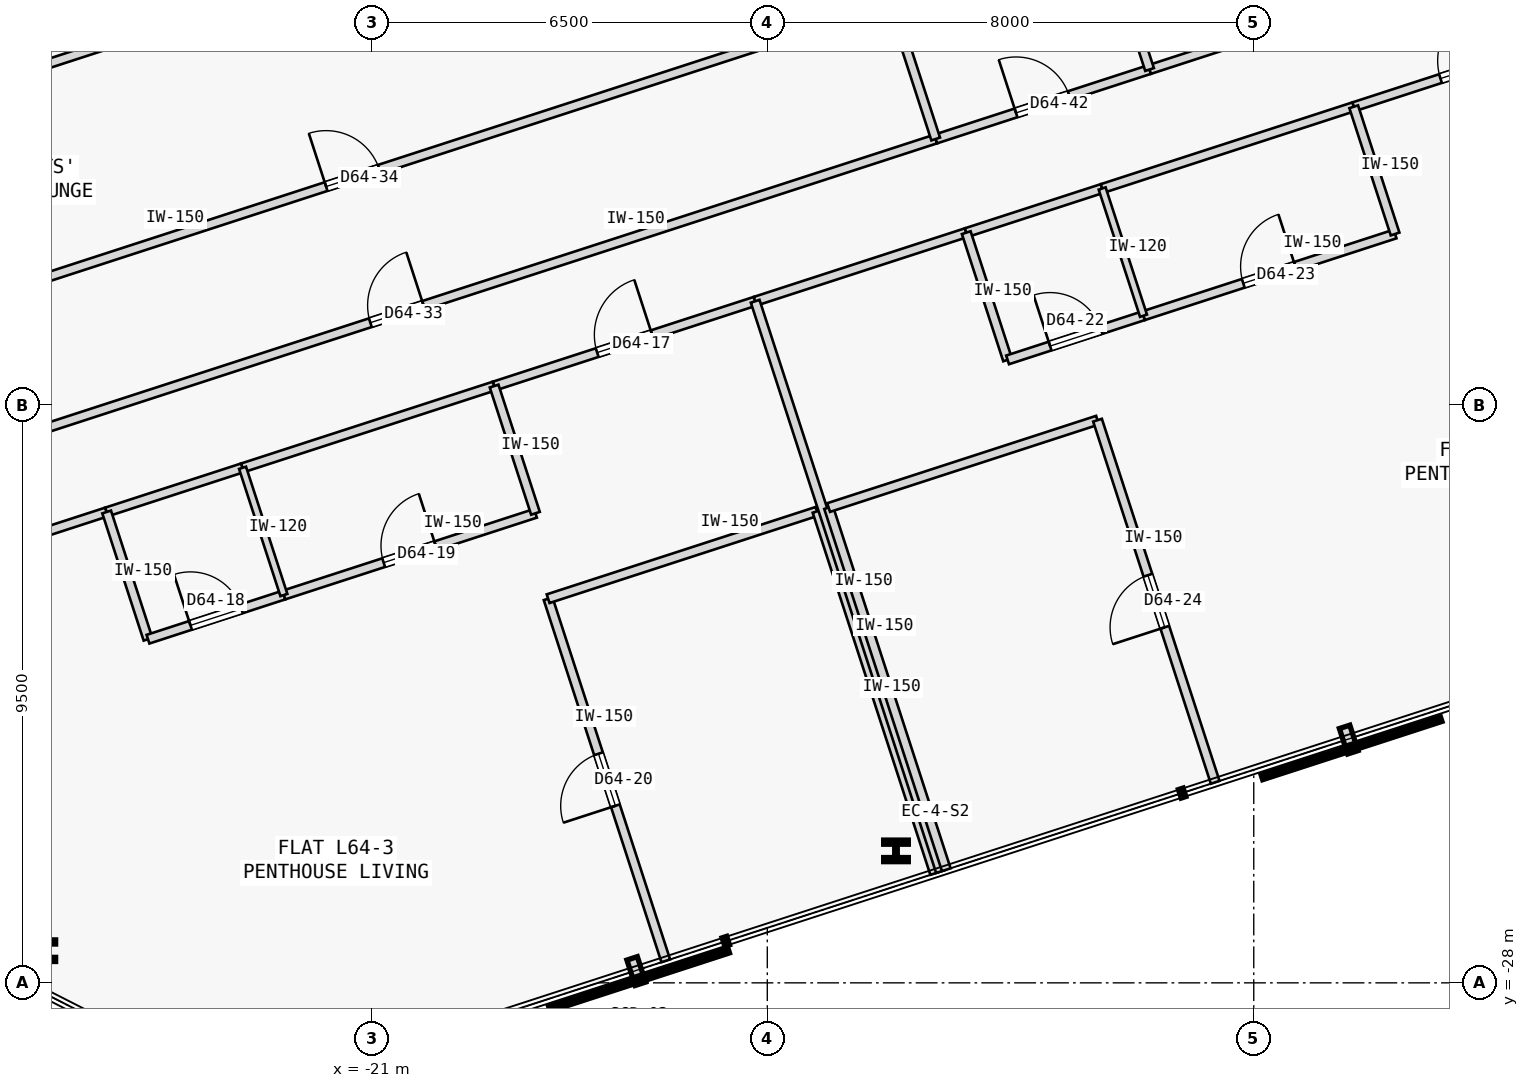
"""IFC4 building model, lengths in metres.
Left out: names, types, materials, properties, quantities, classifications, styles, units other than length and angle.
Written with IfcOpenShell. Run it as: python <this file> out.ifc"""

import sys

from ifc_helpers import new_model, si_unit, direction, frame, frame_2d, origin, origin_2d, place, context, subcontext, project, spatial, rectangle, i_section, extrude, element, fill, save


model = new_model("IFC4")
c1 = context("Model", 3, precision=1e-05, world=origin(), true_north=direction((0.0, 1.0)))
c2 = subcontext(c1, "Body", "Model", "MODEL_VIEW")
j1 = project(units=[si_unit("LENGTHUNIT", "METRE"), si_unit("PLANEANGLEUNIT", "RADIAN")], contexts=[c1])
p1 = place(None, origin())
s1 = spatial("IfcSite", under=j1, at=p1, CompositionType="ELEMENT")
p2 = place(p1, origin())
s2 = spatial("IfcBuilding", under=s1, at=p2, CompositionType="ELEMENT")
p3 = place(p2, frame((0.0, 0.0, 241.05)))
s3 = spatial("IfcBuildingStorey", under=s2, at=p3, CompositionType="ELEMENT", Elevation=241.05)
for number, where, z_axis, x_axis in (
    (1, (-12.384, -25.83, 0.0), (0.0, 0.0, 1.0), (1.0, 0.0, 0.0)),
    (2, (-26.406, -27.471, 0.0), (0.0, 0.0, 1.0), (1.0, 0.0, 0.0)),
):
    element("IfcColumn", number, at=place(p3, frame(where, z_axis=z_axis, x_axis=x_axis)), inside=s3, PredefinedType="COLUMN", context=c2, shape_type="SweptSolid", body=[
        extrude(i_section(OverallWidth=0.405, OverallDepth=0.355, WebThickness=0.042, FlangeThickness=0.068, FilletRadius=0.015, at=origin_2d()), origin(), (0.0, 0.0, 1.0), 3.35),
    ])
p4 = place(p3, frame((-28.95, -21.421, 0.0), z_axis=(0.0, 0.0, 1.0), x_axis=(0.951052151329, 0.309030428036, 0.0)))
e3 = element("IfcWall", 3, at=p4, inside=s3, PredefinedType="PARTITIONING", context=c2, shape_type="SweptSolid", body=[
    extrude(rectangle(XDim=3.77, YDim=0.15, at=frame_2d((1.885, 0.0))), origin(), (0.0, 0.0, 1.0), 3.125),
])
p5 = place(p3, frame((-18.992, -18.186, 0.0), z_axis=(0.0, 0.0, 1.0), x_axis=(0.951067846467, 0.308982121516, 0.0)))
e4 = element("IfcWall", 4, at=p5, inside=s3, PredefinedType="PARTITIONING", context=c2, shape_type="SweptSolid", body=[
    extrude(rectangle(XDim=4.514, YDim=0.15, at=frame_2d((2.257, 0.0))), origin(), (0.0, 0.0, 1.0), 3.125),
])
p6 = place(p5, frame((1.782, 0.0, 0.0)))
e5 = element("IfcOpeningElement", 5, at=p6, cuts=e4, PredefinedType="OPENING", context=c2, shape_type="SweptSolid", body=[
    extrude(rectangle(XDim=0.95, YDim=2.15, at=frame_2d((0.475, 1.075))), frame((0.0, 0.085, 0.0), z_axis=(0.0, -1.0, 0.0), x_axis=(1.0, 0.0, 0.0)), (0.0, 0.0, 1.0), 0.17),
])
p7 = place(p3, frame((-25.365, -20.256, 0.0), z_axis=(0.0, 0.0, 1.0), x_axis=(0.951076048914, 0.308956872689, 0.0)))
e6 = element("IfcWall", 6, at=p7, inside=s3, PredefinedType="PARTITIONING", context=c2, shape_type="SweptSolid", body=[
    extrude(rectangle(XDim=2.35, YDim=0.15, at=frame_2d((1.175, 0.0))), origin(), (0.0, 0.0, 1.0), 3.125),
])
p8 = place(p3, frame((-23.129, -19.53, 0.0), z_axis=(0.0, 0.0, 1.0), x_axis=(0.951036130958, 0.309079726951, 0.0)))
e7 = element("IfcWall", 7, at=p8, inside=s3, PredefinedType="PARTITIONING", context=c2, shape_type="SweptSolid", body=[
    extrude(rectangle(XDim=4.35, YDim=0.15, at=frame_2d((2.175, 0.0))), origin(), (0.0, 0.0, 1.0), 3.125),
])
p9 = place(p3, frame((-14.699, -16.791, 0.0), z_axis=(0.0, 0.0, 1.0), x_axis=(0.951050780541, 0.309034646652, 0.0)))
e8 = element("IfcWall", 8, at=p9, inside=s3, PredefinedType="PARTITIONING", context=c2, shape_type="SweptSolid", body=[
    extrude(rectangle(XDim=3.65, YDim=0.15, at=frame_2d((1.825, 0.0))), origin(), (0.0, 0.0, 1.0), 3.125),
])
p10 = place(p3, frame((-4.856, -13.593, 0.0), z_axis=(0.0, 0.0, 1.0), x_axis=(0.951054051148, 0.309024581215, 0.0)))
e9 = element("IfcWall", 9, at=p10, inside=s3, PredefinedType="PARTITIONING", context=c2, shape_type="SweptSolid", body=[
    extrude(rectangle(XDim=3.95, YDim=0.15, at=frame_2d((1.975, 0.0))), origin(), (0.0, 0.0, 1.0), 3.125),
])
p11 = place(p10, frame((1.5, 0.0, 0.0)))
e10 = element("IfcOpeningElement", 10, at=p11, cuts=e9, PredefinedType="OPENING", context=c2, shape_type="SweptSolid", body=[
    extrude(rectangle(XDim=0.95, YDim=2.15, at=frame_2d((0.475, 1.075))), frame((0.0, 0.085, 0.0), z_axis=(0.0, -1.0, 0.0), x_axis=(1.0, 0.0, 0.0)), (0.0, 0.0, 1.0), 0.17),
])
p12 = place(p3, frame((-11.228, -15.663, 0.0), z_axis=(0.0, 0.0, 1.0), x_axis=(0.951076048914, 0.308956872689, 0.0)))
e11 = element("IfcWall", 11, at=p12, inside=s3, PredefinedType="PARTITIONING", context=c2, shape_type="SweptSolid", body=[
    extrude(rectangle(XDim=2.35, YDim=0.15, at=frame_2d((1.175, 0.0))), origin(), (0.0, 0.0, 1.0), 3.125),
])
p13 = place(p3, frame((-8.993, -14.937, 0.0), z_axis=(0.0, 0.0, 1.0), x_axis=(0.951052627573, 0.309028962374, 0.0)))
e12 = element("IfcWall", 12, at=p13, inside=s3, PredefinedType="PARTITIONING", context=c2, shape_type="SweptSolid", body=[
    extrude(rectangle(XDim=4.35, YDim=0.15, at=frame_2d((2.175, 0.0))), origin(), (0.0, 0.0, 1.0), 3.125),
])
p14 = place(p3, frame((-29.45, -19.881, 0.0), z_axis=(0.0, 0.0, 1.0), x_axis=(0.95105650271, 0.309017036186, 0.0)))
e13 = element("IfcWall", 13, at=p14, inside=s3, PredefinedType="PARTITIONING", context=c2, shape_type="SweptSolid", body=[
    extrude(rectangle(XDim=18.632, YDim=0.15, at=frame_2d((9.316, 0.0))), origin(), (0.0, 0.0, 1.0), 3.125),
])
p15 = place(p14, frame((8.856, 0.0, 0.0)))
e14 = element("IfcOpeningElement", 14, at=p15, cuts=e13, PredefinedType="OPENING", context=c2, shape_type="SweptSolid", body=[
    extrude(rectangle(XDim=0.92, YDim=2.15, at=frame_2d((0.46, 1.075))), frame((0.0, 0.085, 0.0), z_axis=(0.0, -1.0, 0.0), x_axis=(1.0, 0.0, 0.0)), (0.0, 0.0, 1.0), 0.17),
])
p16 = place(p3, frame((-11.73, -14.123, 0.0), z_axis=(0.0, 0.0, 1.0), x_axis=(0.951052502763, 0.309029346483, 0.0)))
e15 = element("IfcWall", 15, at=p16, inside=s3, PredefinedType="PARTITIONING", context=c2, shape_type="SweptSolid", body=[
    extrude(rectangle(XDim=3.698, YDim=0.15, at=frame_2d((1.849, 0.0))), origin(), (0.0, 0.0, 1.0), 3.125),
])
p17 = place(p16, frame((1.389, 0.0, 0.0)))
e16 = element("IfcOpeningElement", 16, at=p17, cuts=e15, PredefinedType="OPENING", context=c2, shape_type="SweptSolid", body=[
    extrude(rectangle(XDim=0.92, YDim=2.15, at=frame_2d((0.46, 1.075))), frame((0.0, 0.085, 0.0), z_axis=(0.0, -1.0, 0.0), x_axis=(1.0, 0.0, 0.0)), (0.0, 0.0, 1.0), 0.17),
])
p18 = place(p3, frame((-8.213, -12.98, 0.0), z_axis=(0.0, 0.0, 1.0), x_axis=(0.951058260096, 0.309011627456, 0.0)))
e17 = element("IfcWall", 17, at=p18, inside=s3, PredefinedType="PARTITIONING", context=c2, shape_type="SweptSolid", body=[
    extrude(rectangle(XDim=4.746, YDim=0.15, at=frame_2d((2.373, 0.0))), origin(), (0.0, 0.0, 1.0), 3.125),
])
p19 = place(p3, frame((-24.685, -22.349, 0.0), z_axis=(0.0, 0.0, 1.0), x_axis=(-0.309060979314, 0.951042223598, 0.0)))
e18 = element("IfcWall", 18, at=p19, inside=s3, PredefinedType="PARTITIONING", context=c2, shape_type="SweptSolid", body=[
    extrude(rectangle(XDim=2.2, YDim=0.15, at=frame_2d((1.1, 0.0))), origin(), (0.0, 0.0, 1.0), 3.125),
])
p20 = place(p3, frame((-24.685, -22.349, 0.0), z_axis=(0.0, 0.0, 1.0), x_axis=(0.951066131077, 0.308987401554, 0.0)))
e19 = element("IfcWall", 19, at=p20, inside=s3, PredefinedType="PARTITIONING", context=c2, shape_type="SweptSolid", body=[
    extrude(rectangle(XDim=2.35, YDim=0.15, at=frame_2d((1.175, 0.0))), origin(), (0.0, 0.0, 1.0), 3.125),
])
p21 = place(p20, frame((0.735, 0.0, 0.0)))
e20 = element("IfcOpeningElement", 20, at=p21, cuts=e19, PredefinedType="OPENING", context=c2, shape_type="SweptSolid", body=[
    extrude(rectangle(XDim=0.88, YDim=2.15, at=frame_2d((0.44, 1.075))), frame((0.0, 0.085, 0.0), z_axis=(0.0, -1.0, 0.0), x_axis=(1.0, 0.0, 0.0)), (0.0, 0.0, 1.0), 0.17),
])
p22 = place(p3, frame((-22.45, -21.623, 0.0), z_axis=(0.0, 0.0, 1.0), x_axis=(0.951057987102, 0.309012467661, 0.0)))
e21 = element("IfcWall", 21, at=p22, inside=s3, PredefinedType="PARTITIONING", context=c2, shape_type="SweptSolid", body=[
    extrude(rectangle(XDim=4.35, YDim=0.15, at=frame_2d((2.175, 0.0))), origin(), (0.0, 0.0, 1.0), 3.125),
])
p23 = place(p22, frame((1.725, 0.0, 0.0)))
e22 = element("IfcOpeningElement", 22, at=p23, cuts=e21, PredefinedType="OPENING", context=c2, shape_type="SweptSolid", body=[
    extrude(rectangle(XDim=0.9, YDim=2.15, at=frame_2d((0.45, 1.075))), frame((0.0, 0.085, 0.0), z_axis=(0.0, -1.0, 0.0), x_axis=(1.0, 0.0, 0.0)), (0.0, 0.0, 1.0), 0.17),
])
p24 = place(p3, frame((-18.312, -20.278, 0.0), z_axis=(0.0, 0.0, 1.0), x_axis=(-0.309028364152, 0.951052821956, 0.0)))
e23 = element("IfcWall", 23, at=p24, inside=s3, PredefinedType="PARTITIONING", context=c2, shape_type="SweptSolid", body=[
    extrude(rectangle(XDim=2.2, YDim=0.15, at=frame_2d((1.1, 0.0))), origin(), (0.0, 0.0, 1.0), 3.125),
])
p25 = place(p3, frame((-16.169, -27.638, 0.0), z_axis=(0.0, 0.0, 1.0), x_axis=(-0.309049046683, 0.951046101272, 0.0)))
e24 = element("IfcWall", 24, at=p25, inside=s3, PredefinedType="PARTITIONING", context=c2, shape_type="SweptSolid", body=[
    extrude(rectangle(XDim=6.262, YDim=0.15, at=frame_2d((3.131, 0.0))), origin(), (0.0, 0.0, 1.0), 3.125),
])
p26 = place(p25, frame((2.681, 0.0, 0.0)))
e25 = element("IfcOpeningElement", 25, at=p26, cuts=e24, PredefinedType="OPENING", context=c2, shape_type="SweptSolid", body=[
    extrude(rectangle(XDim=0.9, YDim=2.15, at=frame_2d((0.45, 1.075))), frame((0.0, 0.085, 0.0), z_axis=(0.0, -1.0, 0.0), x_axis=(1.0, 0.0, 0.0)), (0.0, 0.0, 1.0), 0.17),
])
p27 = place(p3, frame((-18.104, -21.683, 0.0), z_axis=(0.0, 0.0, 1.0), x_axis=(0.951055286502, 0.309020779263, 0.0)))
e26 = element("IfcWall", 26, at=p27, inside=s3, PredefinedType="PARTITIONING", context=c2, shape_type="SweptSolid", body=[
    extrude(rectangle(XDim=4.65, YDim=0.15, at=frame_2d((2.325, 0.0))), origin(), (0.0, 0.0, 1.0), 3.125),
])
p28 = place(p3, frame((-11.747, -26.201, 0.0), z_axis=(0.0, 0.0, 1.0), x_axis=(-0.309013782848, 0.951057559777, 0.0)))
e27 = element("IfcWall", 27, at=p28, inside=s3, PredefinedType="PARTITIONING", context=c2, shape_type="SweptSolid", body=[
    extrude(rectangle(XDim=6.262, YDim=0.15, at=frame_2d((3.131, 0.0))), origin(), (0.0, 0.0, 1.0), 3.125),
])
p29 = place(p3, frame((-11.652, -26.17, 0.0), z_axis=(0.0, 0.0, 1.0), x_axis=(-0.308999867152, 0.951062081097, 0.0)))
e28 = element("IfcWall", 28, at=p29, inside=s3, PredefinedType="PARTITIONING", context=c2, shape_type="SweptSolid", body=[
    extrude(rectangle(XDim=9.862, YDim=0.15, at=frame_2d((4.931, 0.0))), origin(), (0.0, 0.0, 1.0), 3.125),
])
p30 = place(p3, frame((-22.45, -21.623, 0.0), z_axis=(0.0, 0.0, 1.0), x_axis=(-0.308960600764, 0.951074837842, 0.0)))
e29 = element("IfcWall", 29, at=p30, inside=s3, PredefinedType="PARTITIONING", context=c2, shape_type="SweptSolid", body=[
    extrude(rectangle(XDim=2.2, YDim=0.12, at=frame_2d((1.1, 0.0))), origin(), (0.0, 0.0, 1.0), 3.125),
])
p31 = place(p3, frame((-10.548, -17.755, 0.0), z_axis=(0.0, 0.0, 1.0), x_axis=(-0.309060979314, 0.951042223598, 0.0)))
e30 = element("IfcWall", 30, at=p31, inside=s3, PredefinedType="PARTITIONING", context=c2, shape_type="SweptSolid", body=[
    extrude(rectangle(XDim=2.2, YDim=0.15, at=frame_2d((1.1, 0.0))), origin(), (0.0, 0.0, 1.0), 3.125),
])
p32 = place(p3, frame((-10.548, -17.755, 0.0), z_axis=(0.0, 0.0, 1.0), x_axis=(0.951076048914, 0.308956872689, 0.0)))
e31 = element("IfcWall", 31, at=p32, inside=s3, PredefinedType="PARTITIONING", context=c2, shape_type="SweptSolid", body=[
    extrude(rectangle(XDim=2.35, YDim=0.15, at=frame_2d((1.175, 0.0))), origin(), (0.0, 0.0, 1.0), 3.125),
])
p33 = place(p32, frame((0.735, 0.0, 0.0)))
e32 = element("IfcOpeningElement", 32, at=p33, cuts=e31, PredefinedType="OPENING", context=c2, shape_type="SweptSolid", body=[
    extrude(rectangle(XDim=0.88, YDim=2.15, at=frame_2d((0.44, 1.075))), frame((0.0, 0.085, 0.0), z_axis=(0.0, -1.0, 0.0), x_axis=(1.0, 0.0, 0.0)), (0.0, 0.0, 1.0), 0.17),
])
p34 = place(p3, frame((-8.313, -17.029, 0.0), z_axis=(0.0, 0.0, 1.0), x_axis=(0.951052627573, 0.309028962374, 0.0)))
e33 = element("IfcWall", 33, at=p34, inside=s3, PredefinedType="PARTITIONING", context=c2, shape_type="SweptSolid", body=[
    extrude(rectangle(XDim=4.35, YDim=0.15, at=frame_2d((2.175, 0.0))), origin(), (0.0, 0.0, 1.0), 3.125),
])
p35 = place(p34, frame((1.725, 0.0, 0.0)))
e34 = element("IfcOpeningElement", 34, at=p35, cuts=e33, PredefinedType="OPENING", context=c2, shape_type="SweptSolid", body=[
    extrude(rectangle(XDim=0.9, YDim=2.15, at=frame_2d((0.45, 1.075))), frame((0.0, 0.085, 0.0), z_axis=(0.0, -1.0, 0.0), x_axis=(1.0, 0.0, 0.0)), (0.0, 0.0, 1.0), 0.17),
])
p36 = place(p3, frame((-4.176, -15.685, 0.0), z_axis=(0.0, 0.0, 1.0), x_axis=(-0.309060979314, 0.951042223598, 0.0)))
e35 = element("IfcWall", 35, at=p36, inside=s3, PredefinedType="PARTITIONING", context=c2, shape_type="SweptSolid", body=[
    extrude(rectangle(XDim=2.2, YDim=0.15, at=frame_2d((1.1, 0.0))), origin(), (0.0, 0.0, 1.0), 3.125),
])
p37 = place(p3, frame((-11.557, -26.139, 0.0), z_axis=(0.0, 0.0, 1.0), x_axis=(-0.309013782848, 0.951057559777, 0.0)))
e36 = element("IfcWall", 36, at=p37, inside=s3, PredefinedType="PARTITIONING", context=c2, shape_type="SweptSolid", body=[
    extrude(rectangle(XDim=6.262, YDim=0.15, at=frame_2d((3.131, 0.0))), origin(), (0.0, 0.0, 1.0), 3.125),
])
p38 = place(p3, frame((-13.492, -20.184, 0.0), z_axis=(0.0, 0.0, 1.0), x_axis=(0.951065702951, 0.308988719326, 0.0)))
e37 = element("IfcWall", 37, at=p38, inside=s3, PredefinedType="PARTITIONING", context=c2, shape_type="SweptSolid", body=[
    extrude(rectangle(XDim=4.65, YDim=0.15, at=frame_2d((2.325, 0.0))), origin(), (0.0, 0.0, 1.0), 3.125),
])
p39 = place(p3, frame((-7.134, -24.702, 0.0), z_axis=(0.0, 0.0, 1.0), x_axis=(-0.30902524124, 0.951053836687, 0.0)))
e38 = element("IfcWall", 38, at=p39, inside=s3, PredefinedType="PARTITIONING", context=c2, shape_type="SweptSolid", body=[
    extrude(rectangle(XDim=6.262, YDim=0.15, at=frame_2d((3.131, 0.0))), origin(), (0.0, 0.0, 1.0), 3.125),
])
p40 = place(p39, frame((2.681, 0.0, 0.0)))
e39 = element("IfcOpeningElement", 39, at=p40, cuts=e38, PredefinedType="OPENING", context=c2, shape_type="SweptSolid", body=[
    extrude(rectangle(XDim=0.9, YDim=2.15, at=frame_2d((0.45, 1.075))), frame((0.0, 0.085, 0.0), z_axis=(0.0, -1.0, 0.0), x_axis=(1.0, 0.0, 0.0)), (0.0, 0.0, 1.0), 0.17),
])
p41 = place(p3, frame((-8.313, -17.029, 0.0), z_axis=(0.0, 0.0, 1.0), x_axis=(-0.309060979314, 0.951042223598, 0.0)))
e40 = element("IfcWall", 40, at=p41, inside=s3, PredefinedType="PARTITIONING", context=c2, shape_type="SweptSolid", body=[
    extrude(rectangle(XDim=2.2, YDim=0.12, at=frame_2d((1.1, 0.0))), origin(), (0.0, 0.0, 1.0), 3.125),
])
p42 = place(p3, frame((-30.178, -17.642, 0.0), z_axis=(0.0, 0.0, 1.0), x_axis=(0.95105650271, 0.309017036186, 0.0)))
e41 = element("IfcWall", 41, at=p42, inside=s3, PredefinedType="PARTITIONING", context=c2, shape_type="SweptSolid", body=[
    extrude(rectangle(XDim=18.632, YDim=0.15, at=frame_2d((9.316, 0.0))), origin(), (0.0, 0.0, 1.0), 3.125),
])
p43 = place(p42, frame((8.856, 0.0, 0.0)))
e42 = element("IfcOpeningElement", 42, at=p43, cuts=e41, PredefinedType="OPENING", context=c2, shape_type="SweptSolid", body=[
    extrude(rectangle(XDim=0.92, YDim=2.15, at=frame_2d((0.46, 1.075))), frame((0.0, 0.085, 0.0), z_axis=(0.0, -1.0, 0.0), x_axis=(1.0, 0.0, 0.0)), (0.0, 0.0, 1.0), 0.17),
])
p44 = place(p3, frame((-11.73, -14.123, 0.0), z_axis=(0.0, 0.0, 1.0), x_axis=(-0.309062621189, 0.951041690035, 0.0)))
e43 = element("IfcWall", 43, at=p44, inside=s3, PredefinedType="PARTITIONING", context=c2, shape_type="SweptSolid", body=[
    extrude(rectangle(XDim=2.354, YDim=0.15, at=frame_2d((1.177, 0.0))), origin(), (0.0, 0.0, 1.0), 3.125),
])
p45 = place(p3, frame((-31.208, -14.471, 0.0), z_axis=(0.0, 0.0, 1.0), x_axis=(0.951057753948, 0.309013185244, 0.0)))
e44 = element("IfcWall", 44, at=p45, inside=s3, PredefinedType="PARTITIONING", context=c2, shape_type="SweptSolid", body=[
    extrude(rectangle(XDim=18.632, YDim=0.15, at=frame_2d((9.316, 0.0))), origin(), (0.0, 0.0, 1.0), 3.125),
])
p46 = place(p3, frame((-8.213, -12.98, 0.0), z_axis=(0.0, 0.0, 1.0), x_axis=(-0.309017065592, 0.951056493155, 0.0)))
e45 = element("IfcWall", 45, at=p46, inside=s3, PredefinedType="PARTITIONING", context=c2, shape_type="SweptSolid", body=[
    extrude(rectangle(XDim=7.76, YDim=0.15, at=frame_2d((3.88, 0.0))), origin(), (0.0, 0.0, 1.0), 3.125),
])
p47 = place(p6, origin())
e46 = element("IfcDoor", 46, at=p47, inside=s3, OperationType="SINGLE_SWING_RIGHT", PredefinedType="DOOR", context=c2, shape_type="SweptSolid", body=[
    extrude(rectangle(XDim=0.95, YDim=2.15, at=frame_2d((0.475, 1.075))), frame((0.0, 0.025, 0.0), z_axis=(0.0, -1.0, 0.0), x_axis=(1.0, 0.0, 0.0)), (0.0, 0.0, 1.0), 0.05),
])
fill(e5, e46)
p48 = place(p21, origin())
e47 = element("IfcDoor", 47, at=p48, inside=s3, OperationType="SINGLE_SWING_LEFT", PredefinedType="DOOR", context=c2, shape_type="SweptSolid", body=[
    extrude(rectangle(XDim=0.88, YDim=2.15, at=frame_2d((0.44, 1.075))), frame((0.0, 0.025, 0.0), z_axis=(0.0, -1.0, 0.0), x_axis=(1.0, 0.0, 0.0)), (0.0, 0.0, 1.0), 0.05),
])
fill(e20, e47)
p49 = place(p23, origin())
e48 = element("IfcDoor", 48, at=p49, inside=s3, OperationType="SINGLE_SWING_RIGHT", PredefinedType="DOOR", context=c2, shape_type="SweptSolid", body=[
    extrude(rectangle(XDim=0.9, YDim=2.15, at=frame_2d((0.45, 1.075))), frame((0.0, 0.025, 0.0), z_axis=(0.0, -1.0, 0.0), x_axis=(1.0, 0.0, 0.0)), (0.0, 0.0, 1.0), 0.05),
])
fill(e22, e48)
p50 = place(p26, origin())
e49 = element("IfcDoor", 49, at=p50, inside=s3, OperationType="SINGLE_SWING_LEFT", PredefinedType="DOOR", context=c2, shape_type="SweptSolid", body=[
    extrude(rectangle(XDim=0.9, YDim=2.15, at=frame_2d((0.45, 1.075))), frame((0.0, 0.025, 0.0), z_axis=(0.0, -1.0, 0.0), x_axis=(1.0, 0.0, 0.0)), (0.0, 0.0, 1.0), 0.05),
])
fill(e25, e49)
p51 = place(p11, origin())
e50 = element("IfcDoor", 50, at=p51, inside=s3, OperationType="SINGLE_SWING_RIGHT", PredefinedType="DOOR", context=c2, shape_type="SweptSolid", body=[
    extrude(rectangle(XDim=0.95, YDim=2.15, at=frame_2d((0.475, 1.075))), frame((0.0, 0.025, 0.0), z_axis=(0.0, -1.0, 0.0), x_axis=(1.0, 0.0, 0.0)), (0.0, 0.0, 1.0), 0.05),
])
fill(e10, e50)
p52 = place(p33, origin())
e51 = element("IfcDoor", 51, at=p52, inside=s3, OperationType="SINGLE_SWING_LEFT", PredefinedType="DOOR", context=c2, shape_type="SweptSolid", body=[
    extrude(rectangle(XDim=0.88, YDim=2.15, at=frame_2d((0.44, 1.075))), frame((0.0, 0.025, 0.0), z_axis=(0.0, -1.0, 0.0), x_axis=(1.0, 0.0, 0.0)), (0.0, 0.0, 1.0), 0.05),
])
fill(e32, e51)
p53 = place(p35, origin())
e52 = element("IfcDoor", 52, at=p53, inside=s3, OperationType="SINGLE_SWING_RIGHT", PredefinedType="DOOR", context=c2, shape_type="SweptSolid", body=[
    extrude(rectangle(XDim=0.9, YDim=2.15, at=frame_2d((0.45, 1.075))), frame((0.0, 0.025, 0.0), z_axis=(0.0, -1.0, 0.0), x_axis=(1.0, 0.0, 0.0)), (0.0, 0.0, 1.0), 0.05),
])
fill(e34, e52)
p54 = place(p40, origin())
e53 = element("IfcDoor", 53, at=p54, inside=s3, OperationType="SINGLE_SWING_LEFT", PredefinedType="DOOR", context=c2, shape_type="SweptSolid", body=[
    extrude(rectangle(XDim=0.9, YDim=2.15, at=frame_2d((0.45, 1.075))), frame((0.0, 0.025, 0.0), z_axis=(0.0, -1.0, 0.0), x_axis=(1.0, 0.0, 0.0)), (0.0, 0.0, 1.0), 0.05),
])
fill(e39, e53)
p55 = place(p15, origin())
e54 = element("IfcDoor", 54, at=p55, inside=s3, OperationType="SINGLE_SWING_RIGHT", PredefinedType="DOOR", context=c2, shape_type="SweptSolid", body=[
    extrude(rectangle(XDim=0.92, YDim=2.15, at=frame_2d((0.46, 1.075))), frame((0.0, 0.025, 0.0), z_axis=(0.0, -1.0, 0.0), x_axis=(1.0, 0.0, 0.0)), (0.0, 0.0, 1.0), 0.05),
])
fill(e14, e54)
p56 = place(p43, origin())
e55 = element("IfcDoor", 55, at=p56, inside=s3, OperationType="SINGLE_SWING_LEFT", PredefinedType="DOOR", context=c2, shape_type="SweptSolid", body=[
    extrude(rectangle(XDim=0.92, YDim=2.15, at=frame_2d((0.46, 1.075))), frame((0.0, 0.025, 0.0), z_axis=(0.0, -1.0, 0.0), x_axis=(1.0, 0.0, 0.0)), (0.0, 0.0, 1.0), 0.05),
])
fill(e42, e55)
p57 = place(p17, origin())
e56 = element("IfcDoor", 56, at=p57, inside=s3, OperationType="SINGLE_SWING_LEFT", PredefinedType="DOOR", context=c2, shape_type="SweptSolid", body=[
    extrude(rectangle(XDim=0.92, YDim=2.15, at=frame_2d((0.46, 1.075))), frame((0.0, 0.025, 0.0), z_axis=(0.0, -1.0, 0.0), x_axis=(1.0, 0.0, 0.0)), (0.0, 0.0, 1.0), 0.05),
])
fill(e16, e56)
save(model, sys.argv[1])
